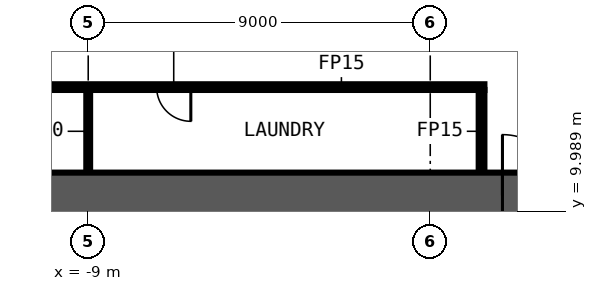
"""IFC4 building model, lengths in metres.
Left out: names, types, materials, properties, quantities, classifications, styles, units other than length and angle.
Written with IfcOpenShell. Run it as: python <this file> out.ifc"""

import sys

from ifc_helpers import new_model, si_unit, direction, frame, frame_2d, origin, place, context, subcontext, project, spatial, rectangle, extrude, element, fill, save


model = new_model("IFC4")
c1 = context("Model", 3, precision=1e-05, world=origin(), true_north=direction((0.0, 1.0)))
c2 = subcontext(c1, "Body", "Model", "MODEL_VIEW")
j1 = project(units=[si_unit("LENGTHUNIT", "METRE"), si_unit("PLANEANGLEUNIT", "RADIAN")], contexts=[c1])
p1 = place(None, origin())
s1 = spatial("IfcSite", under=j1, at=p1, CompositionType="ELEMENT")
p2 = place(p1, origin())
s2 = spatial("IfcBuilding", under=s1, at=p2, CompositionType="ELEMENT")
p3 = place(p2, frame((0.0, 0.0, 62.5)))
s3 = spatial("IfcBuildingStorey", under=s2, at=p3, CompositionType="ELEMENT", Elevation=62.5)
p4 = place(p3, frame((1.425, 13.25, 0.0), z_axis=(0.0, 0.0, 1.0), x_axis=(-1.0, 0.0, 0.0)))
e1 = element("IfcWall", 1, at=p4, inside=s3, PredefinedType="PARTITIONING", context=c2, shape_type="SweptSolid", body=[
    extrude(rectangle(XDim=17.75, YDim=0.15, at=frame_2d((8.875, 0.0))), origin(), (0.0, 0.0, 1.0), 3.3),
])
p5 = place(p4, frame((7.725, 0.0, 0.0)))
e2 = element("IfcOpeningElement", 2, at=p5, cuts=e1, PredefinedType="OPENING", context=c2, shape_type="SweptSolid", body=[
    extrude(rectangle(XDim=0.9, YDim=2.1, at=frame_2d((0.45, 1.05))), frame((0.0, 0.085, 0.0), z_axis=(0.0, -1.0, 0.0), x_axis=(1.0, 0.0, 0.0)), (0.0, 0.0, 1.0), 0.17),
])
p6 = place(p4, frame((13.6, 0.0, 0.0)))
e3 = element("IfcOpeningElement", 3, at=p6, cuts=e1, PredefinedType="OPENING", context=c2, shape_type="SweptSolid", body=[
    extrude(rectangle(XDim=0.9, YDim=2.1, at=frame_2d((0.45, 1.05))), frame((0.0, 0.085, 0.0), z_axis=(0.0, -1.0, 0.0), x_axis=(1.0, 0.0, 0.0)), (0.0, 0.0, 1.0), 0.17),
])
p7 = place(p3, frame((1.35, 11.0, 0.0), z_axis=(0.0, 0.0, 1.0), x_axis=(0.0, 1.0, 0.0)))
e4 = element("IfcWall", 4, at=p7, inside=s3, PredefinedType="PARTITIONING", context=c2, shape_type="SweptSolid", body=[
    extrude(rectangle(XDim=2.175, YDim=0.15, at=frame_2d((1.087, 0.0))), origin(), (0.0, 0.0, 1.0), 3.3),
])
p8 = place(p3, frame((-9.0, 11.0, 0.0), z_axis=(0.0, 0.0, 1.0), x_axis=(0.0, 1.0, 0.0)))
e5 = element("IfcWall", 5, at=p8, inside=s3, PredefinedType="PARTITIONING", context=c2, shape_type="SweptSolid", body=[
    extrude(rectangle(XDim=2.175, YDim=0.1, at=frame_2d((1.087, 0.0))), origin(), (0.0, 0.0, 1.0), 3.3),
])
p9 = place(p3, frame((-14.0, 10.4, 0.0), z_axis=(0.0, 0.0, 1.0), x_axis=(1.0, 0.0, 0.0)))
e6 = element("IfcWall", 6, at=p9, inside=s3, PredefinedType="SHEAR", context=c2, shape_type="SweptSolid", body=[
    extrude(rectangle(XDim=28.0, YDim=1.2, at=frame_2d((14.0, 0.0))), origin(), (0.0, 0.0, 1.0), 3.3),
])
p10 = place(p9, frame((15.9, 0.0, 0.0)))
e7 = element("IfcOpeningElement", 7, at=p10, cuts=e6, PredefinedType="OPENING", context=c2, shape_type="SweptSolid", body=[
    extrude(rectangle(XDim=1.6, YDim=2.1, at=frame_2d((0.8, 1.05))), frame((0.0, 0.61, 0.0), z_axis=(0.0, -1.0, 0.0), x_axis=(1.0, 0.0, 0.0)), (0.0, 0.0, 1.0), 1.22),
])
p11 = place(p5, origin())
e8 = element("IfcDoor", 8, at=p11, inside=s3, OperationType="SINGLE_SWING_RIGHT", PredefinedType="DOOR", context=c2, shape_type="SweptSolid", body=[
    extrude(rectangle(XDim=0.9, YDim=2.1, at=frame_2d((0.45, 1.05))), frame((0.0, 0.025, 0.0), z_axis=(0.0, -1.0, 0.0), x_axis=(1.0, 0.0, 0.0)), (0.0, 0.0, 1.0), 0.05),
])
fill(e2, e8)
p12 = place(p10, origin())
e9 = element("IfcDoor", 9, at=p12, inside=s3, OperationType="DOUBLE_DOOR_SINGLE_SWING", PredefinedType="DOOR", context=c2, shape_type="SweptSolid", body=[
    extrude(rectangle(XDim=1.6, YDim=2.1, at=frame_2d((0.8, 1.05))), frame((0.0, 0.025, 0.0), z_axis=(0.0, -1.0, 0.0), x_axis=(1.0, 0.0, 0.0)), (0.0, 0.0, 1.0), 0.05),
])
fill(e7, e9)
save(model, sys.argv[1])
